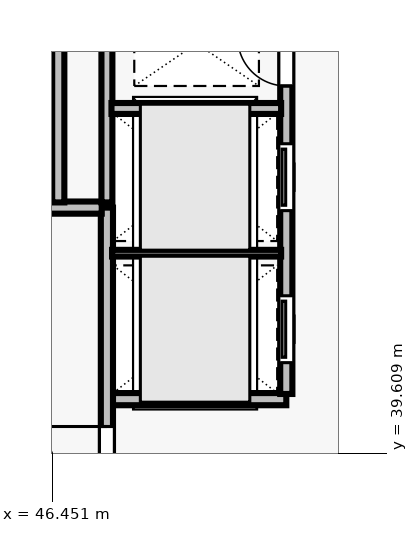
"""IFC4 building model, lengths in metres.
Left out: names, types, materials, properties, quantities, classifications, styles, units other than length and angle.
Written with IfcOpenShell. Run it as: python <this file> out.ifc"""

import sys

from ifc_helpers import new_model, si_unit, direction, frame, frame_2d, origin, place, context, subcontext, project, spatial, rectangle, extrude, element, fill, save


model = new_model("IFC4")
c1 = context("Model", 3, precision=1e-05, world=origin(), true_north=direction((0.0, 1.0)))
c2 = subcontext(c1, "Body", "Model", "MODEL_VIEW")
j1 = project(units=[si_unit("LENGTHUNIT", "METRE"), si_unit("PLANEANGLEUNIT", "RADIAN")], contexts=[c1])
p1 = place(None, origin())
s1 = spatial("IfcSite", under=j1, at=p1, CompositionType="ELEMENT")
p2 = place(p1, origin())
s2 = spatial("IfcBuilding", under=s1, at=p2, CompositionType="ELEMENT")
p3 = place(p2, frame((0.0, 0.0, 284.0)))
s3 = spatial("IfcBuildingStorey", under=s2, at=p3, CompositionType="ELEMENT", Elevation=284.0)
p4 = place(p3, frame((47.35, 40.5, 0.0), z_axis=(0.0, 0.0, 1.0), x_axis=(1.0, 0.0, 0.0)))
e1 = element("IfcWall", 1, at=p4, inside=s3, PredefinedType="SOLIDWALL", context=c2, shape_type="SweptSolid", body=[
    extrude(rectangle(XDim=2.95, YDim=0.2, at=frame_2d((1.475, 0.0))), origin(), (0.0, 0.0, 1.0), 3.29),
])
p5 = place(p3, frame((50.3, 40.585, 0.0), z_axis=(0.0, 0.0, 1.0), x_axis=(0.0, 1.0, 0.0)))
e2 = element("IfcWall", 2, at=p5, inside=s3, PredefinedType="SOLIDWALL", context=c2, shape_type="SweptSolid", body=[
    extrude(rectangle(XDim=6.705, YDim=0.2, at=frame_2d((3.353, 0.0))), origin(), (0.0, 0.0, 1.0), 3.29),
])
p6 = place(p5, frame((0.515, 0.0, 0.0)))
e3 = element("IfcOpeningElement", 3, at=p6, cuts=e2, PredefinedType="OPENING", context=c2, shape_type="SweptSolid", body=[
    extrude(rectangle(XDim=1.1, YDim=2.2, at=frame_2d((0.55, 1.1))), frame((0.0, 0.11, 0.0), z_axis=(0.0, -1.0, 0.0), x_axis=(1.0, 0.0, 0.0)), (0.0, 0.0, 1.0), 0.22),
])
p7 = place(p5, frame((3.015, 0.0, 0.0)))
e4 = element("IfcOpeningElement", 4, at=p7, cuts=e2, PredefinedType="OPENING", context=c2, shape_type="SweptSolid", body=[
    extrude(rectangle(XDim=1.1, YDim=2.2, at=frame_2d((0.55, 1.1))), frame((0.0, 0.11, 0.0), z_axis=(0.0, -1.0, 0.0), x_axis=(1.0, 0.0, 0.0)), (0.0, 0.0, 1.0), 0.22),
])
p8 = place(p5, frame((5.065, 0.0, 0.0)))
e5 = element("IfcOpeningElement", 5, at=p8, cuts=e2, PredefinedType="OPENING", context=c2, shape_type="SweptSolid", body=[
    extrude(rectangle(XDim=0.8, YDim=2.08, at=frame_2d((0.4, 1.04))), frame((0.0, 0.11, 0.0), z_axis=(0.0, -1.0, 0.0), x_axis=(1.0, 0.0, 0.0)), (0.0, 0.0, 1.0), 0.22),
])
p9 = place(p3, frame((47.35, 38.785, 0.0), z_axis=(0.0, 0.0, 1.0), x_axis=(0.0, 1.0, 0.0)))
e6 = element("IfcWall", 6, at=p9, inside=s3, PredefinedType="SOLIDWALL", context=c2, shape_type="SweptSolid", body=[
    extrude(rectangle(XDim=4.865, YDim=0.2, at=frame_2d((2.433, 0.0))), origin(), (0.0, 0.0, 1.0), 3.29),
])
p10 = place(p9, frame((0.265, 0.0, 0.0)))
e7 = element("IfcOpeningElement", 7, at=p10, cuts=e6, PredefinedType="OPENING", context=c2, shape_type="SweptSolid", body=[
    extrude(rectangle(XDim=1.0, YDim=2.15, at=frame_2d((0.5, 1.075))), frame((0.0, 0.11, 0.0), z_axis=(0.0, -1.0, 0.0), x_axis=(1.0, 0.0, 0.0)), (0.0, 0.0, 1.0), 0.22),
])
p11 = place(p3, frame((43.71, 43.65, 0.0), z_axis=(0.0, 0.0, 1.0), x_axis=(1.0, 0.0, 0.0)))
e8 = element("IfcWall", 8, at=p11, inside=s3, PredefinedType="SOLIDWALL", context=c2, shape_type="SweptSolid", body=[
    extrude(rectangle(XDim=3.555, YDim=0.2, at=frame_2d((1.777, 0.0))), origin(), (0.0, 0.0, 1.0), 3.29),
])
p12 = place(p11, frame((1.16, 0.0, 0.0)))
e9 = element("IfcOpeningElement", 9, at=p12, cuts=e8, PredefinedType="OPENING", context=c2, shape_type="SweptSolid", body=[
    extrude(rectangle(XDim=1.1, YDim=2.2, at=frame_2d((0.55, 1.1))), frame((0.0, 0.11, 0.0), z_axis=(0.0, -1.0, 0.0), x_axis=(1.0, 0.0, 0.0)), (0.0, 0.0, 1.0), 0.22),
])
p13 = place(p3, frame((46.55, 43.735, 0.0), z_axis=(0.0, 0.0, 1.0), x_axis=(0.0, 1.0, 0.0)))
e10 = element("IfcWall", 10, at=p13, inside=s3, PredefinedType="SOLIDWALL", context=c2, shape_type="SweptSolid", body=[
    extrude(rectangle(XDim=3.555, YDim=0.2, at=frame_2d((1.777, 0.0))), origin(), (0.0, 0.0, 1.0), 3.29),
])
p14 = place(p3, frame((47.35, 43.735, 0.0), z_axis=(0.0, 0.0, 1.0), x_axis=(0.0, 1.0, 0.0)))
e11 = element("IfcWall", 11, at=p14, inside=s3, PredefinedType="SOLIDWALL", context=c2, shape_type="SweptSolid", body=[
    extrude(rectangle(XDim=3.555, YDim=0.18, at=frame_2d((1.777, 0.0))), origin(), (0.0, 0.0, 1.0), 3.29),
])
p15 = place(p3, frame((47.435, 42.9, 0.0), z_axis=(0.0, 0.0, 1.0), x_axis=(1.0, 0.0, 0.0)))
e12 = element("IfcWall", 12, at=p15, inside=s3, PredefinedType="PARTITIONING", context=c2, shape_type="SweptSolid", body=[
    extrude(rectangle(XDim=2.78, YDim=0.11, at=frame_2d((1.39, 0.0))), origin(), (0.0, 0.0, 1.0), 3.29),
])
p16 = place(p3, frame((47.425, 45.28, 0.0), z_axis=(0.0, 0.0, 1.0), x_axis=(1.0, 0.0, 0.0)))
e13 = element("IfcWall", 13, at=p16, inside=s3, PredefinedType="SOLIDWALL", context=c2, shape_type="SweptSolid", body=[
    extrude(rectangle(XDim=2.79, YDim=0.18, at=frame_2d((1.395, 0.0))), origin(), (0.0, 0.0, 1.0), 3.29),
])
p17 = place(p10, origin())
e14 = element("IfcDoor", 14, at=p17, inside=s3, OperationType="SINGLE_SWING_RIGHT", PredefinedType="DOOR", context=c2, shape_type="SweptSolid", body=[
    extrude(rectangle(XDim=1.0, YDim=2.15, at=frame_2d((0.5, 1.075))), frame((0.0, 0.025, 0.0), z_axis=(0.0, -1.0, 0.0), x_axis=(1.0, 0.0, 0.0)), (0.0, 0.0, 1.0), 0.05),
])
fill(e7, e14)
p18 = place(p6, origin())
e15 = element("IfcDoor", 15, at=p18, inside=s3, OperationType="SLIDING_TO_LEFT", PredefinedType="DOOR", context=c2, shape_type="SweptSolid", body=[
    extrude(rectangle(XDim=1.1, YDim=2.2, at=frame_2d((0.55, 1.1))), frame((0.0, 0.025, 0.0), z_axis=(0.0, -1.0, 0.0), x_axis=(1.0, 0.0, 0.0)), (0.0, 0.0, 1.0), 0.05),
])
fill(e3, e15)
p19 = place(p7, origin())
e16 = element("IfcDoor", 16, at=p19, inside=s3, OperationType="SLIDING_TO_LEFT", PredefinedType="DOOR", context=c2, shape_type="SweptSolid", body=[
    extrude(rectangle(XDim=1.1, YDim=2.2, at=frame_2d((0.55, 1.1))), frame((0.0, 0.025, 0.0), z_axis=(0.0, -1.0, 0.0), x_axis=(1.0, 0.0, 0.0)), (0.0, 0.0, 1.0), 0.05),
])
fill(e4, e16)
p20 = place(p8, origin())
e17 = element("IfcDoor", 17, at=p20, inside=s3, OperationType="SINGLE_SWING_RIGHT", PredefinedType="DOOR", context=c2, shape_type="SweptSolid", body=[
    extrude(rectangle(XDim=0.8, YDim=2.08, at=frame_2d((0.4, 1.04))), frame((0.0, 0.025, 0.0), z_axis=(0.0, -1.0, 0.0), x_axis=(1.0, 0.0, 0.0)), (0.0, 0.0, 1.0), 0.05),
])
fill(e5, e17)
save(model, sys.argv[1])
